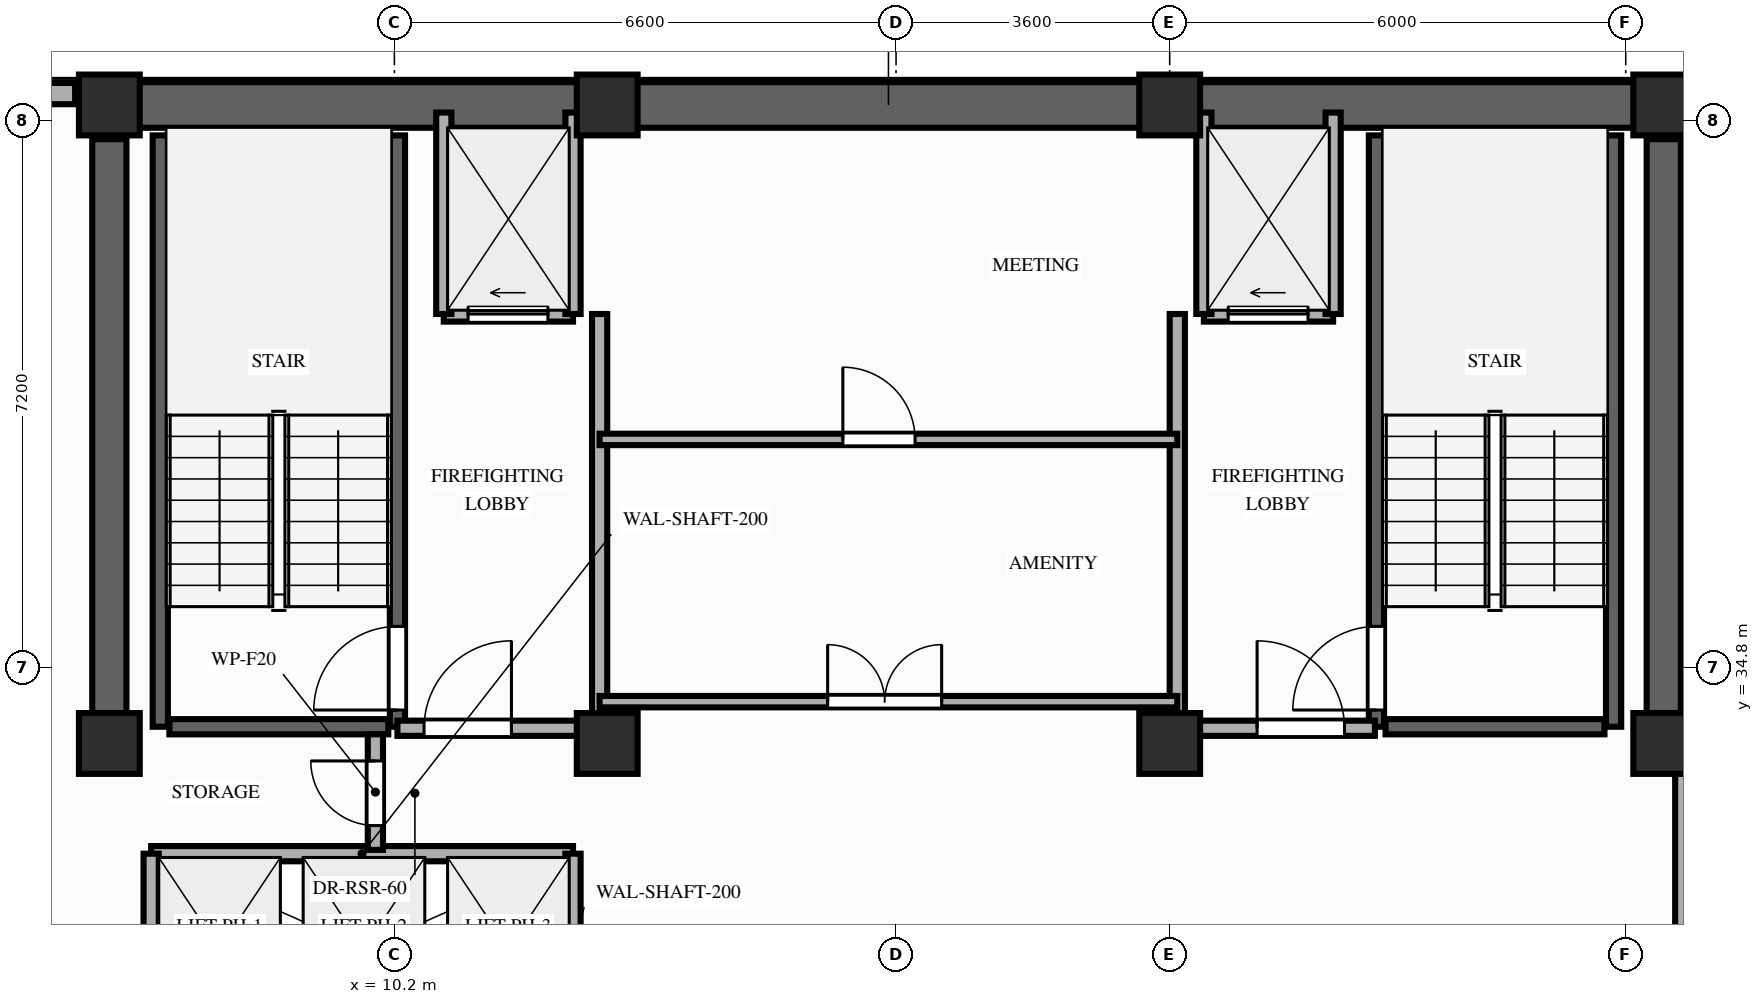
"""IFC4 building model, lengths in metres.
Left out: names, types, materials, properties, quantities, classifications, styles, units other than length and angle.
Written with IfcOpenShell. Run it as: python <this file> out.ifc"""

import sys

from ifc_helpers import new_model, si_unit, direction, frame, frame_2d, origin, origin_2d, place, context, subcontext, project, spatial, rectangle, extrude, element, fill, save


model = new_model("IFC4")
c1 = context("Model", 3, precision=1e-05, world=origin(), true_north=direction((0.0, 1.0)))
c2 = subcontext(c1, "Body", "Model", "MODEL_VIEW")
j1 = project(units=[si_unit("LENGTHUNIT", "METRE"), si_unit("PLANEANGLEUNIT", "RADIAN")], contexts=[c1])
p1 = place(None, origin())
s1 = spatial("IfcSite", under=j1, at=p1, CompositionType="ELEMENT")
p2 = place(p1, origin())
s2 = spatial("IfcBuilding", under=s1, at=p2, CompositionType="ELEMENT")
p3 = place(p2, frame((0.0, 0.0, 195.2)))
s3 = spatial("IfcBuildingStorey", under=s2, at=p3, CompositionType="ELEMENT", Elevation=195.2)
for number, where, z_axis, x_axis in (
    (1, (6.45, 33.8, 0.0), (0.0, 0.0, 1.0), (1.0, 0.0, 0.0)),
    (2, (13.0, 33.8, 0.0), (0.0, 0.0, 1.0), (1.0, 0.0, 0.0)),
    (3, (20.4, 33.8, 0.0), (0.0, 0.0, 1.0), (1.0, 0.0, 0.0)),
    (4, (26.9, 33.8, 0.0), (0.0, 0.0, 1.0), (1.0, 0.0, 0.0)),
    (5, (6.45, 42.2, 0.0), (0.0, 0.0, 1.0), (1.0, 0.0, 0.0)),
    (6, (13.0, 42.2, 0.0), (0.0, 0.0, 1.0), (1.0, 0.0, 0.0)),
    (7, (20.4, 42.2, 0.0), (0.0, 0.0, 1.0), (1.0, 0.0, 0.0)),
    (8, (26.9, 42.2, 0.0), (0.0, 0.0, 1.0), (1.0, 0.0, 0.0)),
):
    element("IfcColumn", number, at=place(p3, frame(where, z_axis=z_axis, x_axis=x_axis)), inside=s3, PredefinedType="COLUMN", context=c2, shape_type="SweptSolid", body=[
        extrude(rectangle(XDim=0.8, YDim=0.8, at=origin_2d()), origin(), (0.0, 0.0, 1.0), 3.2),
    ])
p4 = place(p3, frame((6.0, 42.35, 0.0), z_axis=(0.0, 0.0, 1.0), x_axis=(-1.0, 0.0, 0.0)))
e9 = element("IfcWall", 9, at=p4, inside=s3, PredefinedType="STANDARD", context=c2, shape_type="SweptSolid", body=[
    extrude(rectangle(XDim=2.0, YDim=0.28, at=frame_2d((1.0, 0.0))), origin(), (0.0, 0.0, 1.0), 3.02),
])
p5 = place(p3, frame((6.45, 42.2, 0.0), z_axis=(0.0, 0.0, 1.0), x_axis=(1.0, 0.0, 0.0)))
e10 = element("IfcWall", 10, at=p5, inside=s3, PredefinedType="SHEAR", context=c2, shape_type="SweptSolid", body=[
    extrude(rectangle(XDim=20.45, YDim=0.6, at=frame_2d((10.225, 0.0))), origin(), (0.0, 0.0, 1.0), 3.02),
])
for number, where, z_axis, x_axis in (
    (11, (6.45, 33.8, 0.0), (0.0, 0.0, 1.0), (0.0, 1.0, 0.0)),
    (12, (26.9, 33.8, 0.0), (0.0, 0.0, 1.0), (0.0, 1.0, 0.0)),
):
    element("IfcWall", number, at=place(p3, frame(where, z_axis=z_axis, x_axis=x_axis)), inside=s3, PredefinedType="SHEAR", context=c2, shape_type="SweptSolid", body=[
        extrude(rectangle(XDim=7.95, YDim=0.45, at=frame_2d((3.975, 0.0))), origin(), (0.0, 0.0, 1.0), 3.02),
    ])
p6 = place(p3, frame((7.12, 34.02, 0.0), z_axis=(0.0, 0.0, 1.0), x_axis=(0.0, 1.0, 0.0)))
e13 = element("IfcWall", 13, at=p6, inside=s3, PredefinedType="SHEAR", context=c2, shape_type="SweptSolid", body=[
    extrude(rectangle(XDim=7.78, YDim=0.2, at=frame_2d((3.89, 0.0))), origin(), (0.0, 0.0, 1.0), 3.02),
])
p7 = place(p3, frame((10.24, 34.02, 0.0), z_axis=(0.0, 0.0, 1.0), x_axis=(0.0, 1.0, 0.0)))
e14 = element("IfcWall", 14, at=p7, inside=s3, PredefinedType="SHEAR", context=c2, shape_type="SweptSolid", body=[
    extrude(rectangle(XDim=7.78, YDim=0.2, at=frame_2d((3.89, 0.0))), origin(), (0.0, 0.0, 1.0), 3.02),
])
p8 = place(p7, frame((0.22, 0.0, 0.0)))
e15 = element("IfcOpeningElement", 15, at=p8, cuts=e14, PredefinedType="OPENING", context=c2, shape_type="SweptSolid", body=[
    extrude(rectangle(XDim=1.1, YDim=2.15, at=frame_2d((0.55, 1.075))), frame((0.0, 0.11, 0.0), z_axis=(0.0, -1.0, 0.0), x_axis=(1.0, 0.0, 0.0)), (0.0, 0.0, 1.0), 0.22),
])
p9 = place(p3, frame((7.24, 34.02, 0.0), z_axis=(0.0, 0.0, 1.0), x_axis=(1.0, 0.0, 0.0)))
e16 = element("IfcWall", 16, at=p9, inside=s3, PredefinedType="SHEAR", context=c2, shape_type="SweptSolid", body=[
    extrude(rectangle(XDim=2.88, YDim=0.2, at=frame_2d((1.44, 0.0))), origin(), (0.0, 0.0, 1.0), 3.02),
])
p10 = place(p3, frame((23.12, 34.02, 0.0), z_axis=(0.0, 0.0, 1.0), x_axis=(0.0, 1.0, 0.0)))
e17 = element("IfcWall", 17, at=p10, inside=s3, PredefinedType="SHEAR", context=c2, shape_type="SweptSolid", body=[
    extrude(rectangle(XDim=7.78, YDim=0.2, at=frame_2d((3.89, 0.0))), origin(), (0.0, 0.0, 1.0), 3.02),
])
p11 = place(p10, frame((0.22, 0.0, 0.0)))
e18 = element("IfcOpeningElement", 18, at=p11, cuts=e17, PredefinedType="OPENING", context=c2, shape_type="SweptSolid", body=[
    extrude(rectangle(XDim=1.1, YDim=2.15, at=frame_2d((0.55, 1.075))), frame((0.0, 0.11, 0.0), z_axis=(0.0, -1.0, 0.0), x_axis=(1.0, 0.0, 0.0)), (0.0, 0.0, 1.0), 0.22),
])
p12 = place(p3, frame((26.24, 34.02, 0.0), z_axis=(0.0, 0.0, 1.0), x_axis=(0.0, 1.0, 0.0)))
e19 = element("IfcWall", 19, at=p12, inside=s3, PredefinedType="SHEAR", context=c2, shape_type="SweptSolid", body=[
    extrude(rectangle(XDim=7.78, YDim=0.2, at=frame_2d((3.89, 0.0))), origin(), (0.0, 0.0, 1.0), 3.02),
])
p13 = place(p3, frame((23.24, 34.02, 0.0), z_axis=(0.0, 0.0, 1.0), x_axis=(1.0, 0.0, 0.0)))
e20 = element("IfcWall", 20, at=p13, inside=s3, PredefinedType="SHEAR", context=c2, shape_type="SweptSolid", body=[
    extrude(rectangle(XDim=2.88, YDim=0.2, at=frame_2d((1.44, 0.0))), origin(), (0.0, 0.0, 1.0), 3.02),
])
p14 = place(p3, frame((7.0, 32.35, 0.0), z_axis=(0.0, 0.0, 1.0), x_axis=(1.0, 0.0, 0.0)))
e21 = element("IfcWall", 21, at=p14, inside=s3, PredefinedType="MOVABLE", context=c2, shape_type="SweptSolid", body=[
    extrude(rectangle(XDim=5.55, YDim=0.2, at=frame_2d((2.775, 0.0))), origin(), (0.0, 0.0, 1.0), 3.02),
])
for number, where, z_axis, x_axis in (
    (22, (7.0, 29.85, 0.0), (0.0, 0.0, 1.0), (0.0, 1.0, 0.0)),
    (23, (12.55, 29.85, 0.0), (0.0, 0.0, 1.0), (0.0, 1.0, 0.0)),
):
    element("IfcWall", number, at=place(p3, frame(where, z_axis=z_axis, x_axis=x_axis)), inside=s3, PredefinedType="MOVABLE", context=c2, shape_type="SweptSolid", body=[
        extrude(rectangle(XDim=2.5, YDim=0.2, at=frame_2d((1.25, 0.0))), origin(), (0.0, 0.0, 1.0), 3.02),
    ])
p15 = place(p3, frame((10.85, 39.45, 0.0), z_axis=(0.0, 0.0, 1.0), x_axis=(1.0, 0.0, 0.0)))
e24 = element("IfcWall", 24, at=p15, inside=s3, PredefinedType="MOVABLE", context=c2, shape_type="SweptSolid", body=[
    extrude(rectangle(XDim=1.7, YDim=0.2, at=frame_2d((0.85, 0.0))), origin(), (0.0, 0.0, 1.0), 3.02),
])
p16 = place(p15, frame((0.32, 0.0, 0.0)))
e25 = element("IfcOpeningElement", 25, at=p16, cuts=e24, PredefinedType="OPENING", context=c2, shape_type="SweptSolid", body=[
    extrude(rectangle(XDim=1.05, YDim=2.15, at=frame_2d((0.525, 1.075))), frame((0.0, 0.11, 0.0), z_axis=(0.0, -1.0, 0.0), x_axis=(1.0, 0.0, 0.0)), (0.0, 0.0, 1.0), 0.22),
])
p17 = place(p3, frame((20.85, 39.45, 0.0), z_axis=(0.0, 0.0, 1.0), x_axis=(1.0, 0.0, 0.0)))
e26 = element("IfcWall", 26, at=p17, inside=s3, PredefinedType="MOVABLE", context=c2, shape_type="SweptSolid", body=[
    extrude(rectangle(XDim=1.7, YDim=0.2, at=frame_2d((0.85, 0.0))), origin(), (0.0, 0.0, 1.0), 3.02),
])
p18 = place(p17, frame((0.32, 0.0, 0.0)))
e27 = element("IfcOpeningElement", 27, at=p18, cuts=e26, PredefinedType="OPENING", context=c2, shape_type="SweptSolid", body=[
    extrude(rectangle(XDim=1.05, YDim=2.15, at=frame_2d((0.525, 1.075))), frame((0.0, 0.11, 0.0), z_axis=(0.0, -1.0, 0.0), x_axis=(1.0, 0.0, 0.0)), (0.0, 0.0, 1.0), 0.22),
])
for number, where, z_axis, x_axis in (
    (28, (10.85, 39.45, 0.0), (0.0, 0.0, 1.0), (0.0, 1.0, 0.0)),
    (29, (12.55, 39.45, 0.0), (0.0, 0.0, 1.0), (0.0, 1.0, 0.0)),
):
    element("IfcWall", number, at=place(p3, frame(where, z_axis=z_axis, x_axis=x_axis)), inside=s3, PredefinedType="MOVABLE", context=c2, shape_type="SweptSolid", body=[
        extrude(rectangle(XDim=2.65, YDim=0.2, at=frame_2d((1.325, 0.0))), origin(), (0.0, 0.0, 1.0), 2.51),
    ])
p19 = place(p3, frame((12.9, 34.0, 0.0), z_axis=(0.0, 0.0, 1.0), x_axis=(0.0, 1.0, 0.0)))
e30 = element("IfcWall", 30, at=p19, inside=s3, PredefinedType="PARTITIONING", context=c2, shape_type="SweptSolid", body=[
    extrude(rectangle(XDim=5.45, YDim=0.2, at=frame_2d((2.725, 0.0))), origin(), (0.0, 0.0, 1.0), 2.51),
])
p20 = place(p3, frame((10.24, 34.0, 0.0), z_axis=(0.0, 0.0, 1.0), x_axis=(1.0, 0.0, 0.0)))
e31 = element("IfcWall", 31, at=p20, inside=s3, PredefinedType="PARTITIONING", context=c2, shape_type="SweptSolid", body=[
    extrude(rectangle(XDim=2.66, YDim=0.2, at=frame_2d((1.33, 0.0))), origin(), (0.0, 0.0, 1.0), 2.51),
])
p21 = place(p20, frame((0.35, 0.0, 0.0)))
e32 = element("IfcOpeningElement", 32, at=p21, cuts=e31, PredefinedType="OPENING", context=c2, shape_type="SweptSolid", body=[
    extrude(rectangle(XDim=1.15, YDim=2.15, at=frame_2d((0.575, 1.075))), frame((0.0, 0.11, 0.0), z_axis=(0.0, -1.0, 0.0), x_axis=(1.0, 0.0, 0.0)), (0.0, 0.0, 1.0), 0.22),
])
for number, where, z_axis, x_axis in (
    (33, (20.85, 39.45, 0.0), (0.0, 0.0, 1.0), (0.0, 1.0, 0.0)),
    (34, (22.55, 39.45, 0.0), (0.0, 0.0, 1.0), (0.0, 1.0, 0.0)),
):
    element("IfcWall", number, at=place(p3, frame(where, z_axis=z_axis, x_axis=x_axis)), inside=s3, PredefinedType="MOVABLE", context=c2, shape_type="SweptSolid", body=[
        extrude(rectangle(XDim=2.65, YDim=0.2, at=frame_2d((1.325, 0.0))), origin(), (0.0, 0.0, 1.0), 2.51),
    ])
p22 = place(p3, frame((20.5, 34.0, 0.0), z_axis=(0.0, 0.0, 1.0), x_axis=(0.0, 1.0, 0.0)))
e35 = element("IfcWall", 35, at=p22, inside=s3, PredefinedType="PARTITIONING", context=c2, shape_type="SweptSolid", body=[
    extrude(rectangle(XDim=5.45, YDim=0.2, at=frame_2d((2.725, 0.0))), origin(), (0.0, 0.0, 1.0), 2.51),
])
p23 = place(p3, frame((20.5, 34.0, 0.0), z_axis=(0.0, 0.0, 1.0), x_axis=(1.0, 0.0, 0.0)))
e36 = element("IfcWall", 36, at=p23, inside=s3, PredefinedType="PARTITIONING", context=c2, shape_type="SweptSolid", body=[
    extrude(rectangle(XDim=2.6, YDim=0.2, at=frame_2d((1.3, 0.0))), origin(), (0.0, 0.0, 1.0), 2.51),
])
p24 = place(p23, frame((1.05, 0.0, 0.0)))
e37 = element("IfcOpeningElement", 37, at=p24, cuts=e36, PredefinedType="OPENING", context=c2, shape_type="SweptSolid", body=[
    extrude(rectangle(XDim=1.15, YDim=2.15, at=frame_2d((0.575, 1.075))), frame((0.0, 0.11, 0.0), z_axis=(0.0, -1.0, 0.0), x_axis=(1.0, 0.0, 0.0)), (0.0, 0.0, 1.0), 0.22),
])
p25 = place(p3, frame((9.95, 32.4, 0.0), z_axis=(0.0, 0.0, 1.0), x_axis=(0.0, 1.0, 0.0)))
e38 = element("IfcWall", 38, at=p25, inside=s3, PredefinedType="PARTITIONING", context=c2, shape_type="SweptSolid", body=[
    extrude(rectangle(XDim=1.52, YDim=0.2, at=frame_2d((0.76, 0.0))), origin(), (0.0, 0.0, 1.0), 2.51),
])
p26 = place(p25, frame((0.32, 0.0, 0.0)))
e39 = element("IfcOpeningElement", 39, at=p26, cuts=e38, PredefinedType="OPENING", context=c2, shape_type="SweptSolid", body=[
    extrude(rectangle(XDim=0.85, YDim=2.05, at=frame_2d((0.425, 1.025))), frame((0.0, 0.11, 0.0), z_axis=(0.0, -1.0, 0.0), x_axis=(1.0, 0.0, 0.0)), (0.0, 0.0, 1.0), 0.22),
])
p27 = place(p3, frame((12.9, 34.35, 0.0), z_axis=(0.0, 0.0, 1.0), x_axis=(1.0, 0.0, 0.0)))
e40 = element("IfcWall", 40, at=p27, inside=s3, PredefinedType="PARTITIONING", context=c2, shape_type="SweptSolid", body=[
    extrude(rectangle(XDim=7.6, YDim=0.15, at=frame_2d((3.8, 0.0))), origin(), (0.0, 0.0, 1.0), 3.02),
])
p28 = place(p27, frame((3.0, 0.0, 0.0)))
e41 = element("IfcOpeningElement", 41, at=p28, cuts=e40, PredefinedType="OPENING", context=c2, shape_type="SweptSolid", body=[
    extrude(rectangle(XDim=1.5, YDim=2.15, at=frame_2d((0.75, 1.075))), frame((0.0, 0.085, 0.0), z_axis=(0.0, -1.0, 0.0), x_axis=(1.0, 0.0, 0.0)), (0.0, 0.0, 1.0), 0.17),
])
p29 = place(p3, frame((12.9, 37.8, 0.0), z_axis=(0.0, 0.0, 1.0), x_axis=(1.0, 0.0, 0.0)))
e42 = element("IfcWall", 42, at=p29, inside=s3, PredefinedType="PARTITIONING", context=c2, shape_type="SweptSolid", body=[
    extrude(rectangle(XDim=7.6, YDim=0.15, at=frame_2d((3.8, 0.0))), origin(), (0.0, 0.0, 1.0), 3.02),
])
p30 = place(p29, frame((3.2, 0.0, 0.0)))
e43 = element("IfcOpeningElement", 43, at=p30, cuts=e42, PredefinedType="OPENING", context=c2, shape_type="SweptSolid", body=[
    extrude(rectangle(XDim=0.95, YDim=2.15, at=frame_2d((0.475, 1.075))), frame((0.0, 0.085, 0.0), z_axis=(0.0, -1.0, 0.0), x_axis=(1.0, 0.0, 0.0)), (0.0, 0.0, 1.0), 0.17),
])
p31 = place(p3, frame((27.15, 31.2, 0.0), z_axis=(0.0, 0.0, 1.0), x_axis=(0.0, 1.0, 0.0)))
e44 = element("IfcWall", 44, at=p31, inside=s3, PredefinedType="PARTITIONING", context=c2, shape_type="SweptSolid", body=[
    extrude(rectangle(XDim=2.48, YDim=0.2, at=frame_2d((1.24, 0.0))), origin(), (0.0, 0.0, 1.0), 2.51),
])
p32 = place(p8, origin())
e45 = element("IfcDoor", 45, at=p32, inside=s3, OperationType="SINGLE_SWING_LEFT", PredefinedType="DOOR", context=c2, shape_type="SweptSolid", body=[
    extrude(rectangle(XDim=1.1, YDim=2.15, at=frame_2d((0.55, 1.075))), frame((0.0, 0.025, 0.0), z_axis=(0.0, -1.0, 0.0), x_axis=(1.0, 0.0, 0.0)), (0.0, 0.0, 1.0), 0.05),
])
fill(e15, e45)
p33 = place(p11, origin())
e46 = element("IfcDoor", 46, at=p33, inside=s3, OperationType="SINGLE_SWING_LEFT", PredefinedType="DOOR", context=c2, shape_type="SweptSolid", body=[
    extrude(rectangle(XDim=1.1, YDim=2.15, at=frame_2d((0.55, 1.075))), frame((0.0, 0.025, 0.0), z_axis=(0.0, -1.0, 0.0), x_axis=(1.0, 0.0, 0.0)), (0.0, 0.0, 1.0), 0.05),
])
fill(e18, e46)
p34 = place(p16, origin())
e47 = element("IfcDoor", 47, at=p34, inside=s3, OperationType="SLIDING_TO_LEFT", PredefinedType="DOOR", context=c2, shape_type="SweptSolid", body=[
    extrude(rectangle(XDim=1.05, YDim=2.15, at=frame_2d((0.525, 1.075))), frame((0.0, 0.025, 0.0), z_axis=(0.0, -1.0, 0.0), x_axis=(1.0, 0.0, 0.0)), (0.0, 0.0, 1.0), 0.05),
])
fill(e25, e47)
p35 = place(p18, origin())
e48 = element("IfcDoor", 48, at=p35, inside=s3, OperationType="SLIDING_TO_LEFT", PredefinedType="DOOR", context=c2, shape_type="SweptSolid", body=[
    extrude(rectangle(XDim=1.05, YDim=2.15, at=frame_2d((0.525, 1.075))), frame((0.0, 0.025, 0.0), z_axis=(0.0, -1.0, 0.0), x_axis=(1.0, 0.0, 0.0)), (0.0, 0.0, 1.0), 0.05),
])
fill(e27, e48)
p36 = place(p21, origin())
e49 = element("IfcDoor", 49, at=p36, inside=s3, OperationType="SINGLE_SWING_RIGHT", PredefinedType="DOOR", context=c2, shape_type="SweptSolid", body=[
    extrude(rectangle(XDim=1.15, YDim=2.15, at=frame_2d((0.575, 1.075))), frame((0.0, 0.025, 0.0), z_axis=(0.0, -1.0, 0.0), x_axis=(1.0, 0.0, 0.0)), (0.0, 0.0, 1.0), 0.05),
])
fill(e32, e49)
p37 = place(p24, origin())
e50 = element("IfcDoor", 50, at=p37, inside=s3, OperationType="SINGLE_SWING_LEFT", PredefinedType="DOOR", context=c2, shape_type="SweptSolid", body=[
    extrude(rectangle(XDim=1.15, YDim=2.15, at=frame_2d((0.575, 1.075))), frame((0.0, 0.025, 0.0), z_axis=(0.0, -1.0, 0.0), x_axis=(1.0, 0.0, 0.0)), (0.0, 0.0, 1.0), 0.05),
])
fill(e37, e50)
p38 = place(p26, origin())
e51 = element("IfcDoor", 51, at=p38, inside=s3, OperationType="SINGLE_SWING_RIGHT", PredefinedType="DOOR", context=c2, shape_type="SweptSolid", body=[
    extrude(rectangle(XDim=0.85, YDim=2.05, at=frame_2d((0.425, 1.025))), frame((0.0, 0.025, 0.0), z_axis=(0.0, -1.0, 0.0), x_axis=(1.0, 0.0, 0.0)), (0.0, 0.0, 1.0), 0.05),
])
fill(e39, e51)
p39 = place(p28, origin())
e52 = element("IfcDoor", 52, at=p39, inside=s3, OperationType="DOUBLE_DOOR_SINGLE_SWING", PredefinedType="DOOR", context=c2, shape_type="SweptSolid", body=[
    extrude(rectangle(XDim=1.5, YDim=2.15, at=frame_2d((0.75, 1.075))), frame((0.0, 0.025, 0.0), z_axis=(0.0, -1.0, 0.0), x_axis=(1.0, 0.0, 0.0)), (0.0, 0.0, 1.0), 0.05),
])
fill(e41, e52)
p40 = place(p30, origin())
e53 = element("IfcDoor", 53, at=p40, inside=s3, OperationType="SINGLE_SWING_LEFT", PredefinedType="DOOR", context=c2, shape_type="SweptSolid", body=[
    extrude(rectangle(XDim=0.95, YDim=2.15, at=frame_2d((0.475, 1.075))), frame((0.0, 0.025, 0.0), z_axis=(0.0, -1.0, 0.0), x_axis=(1.0, 0.0, 0.0)), (0.0, 0.0, 1.0), 0.05),
])
fill(e43, e53)
save(model, sys.argv[1])
